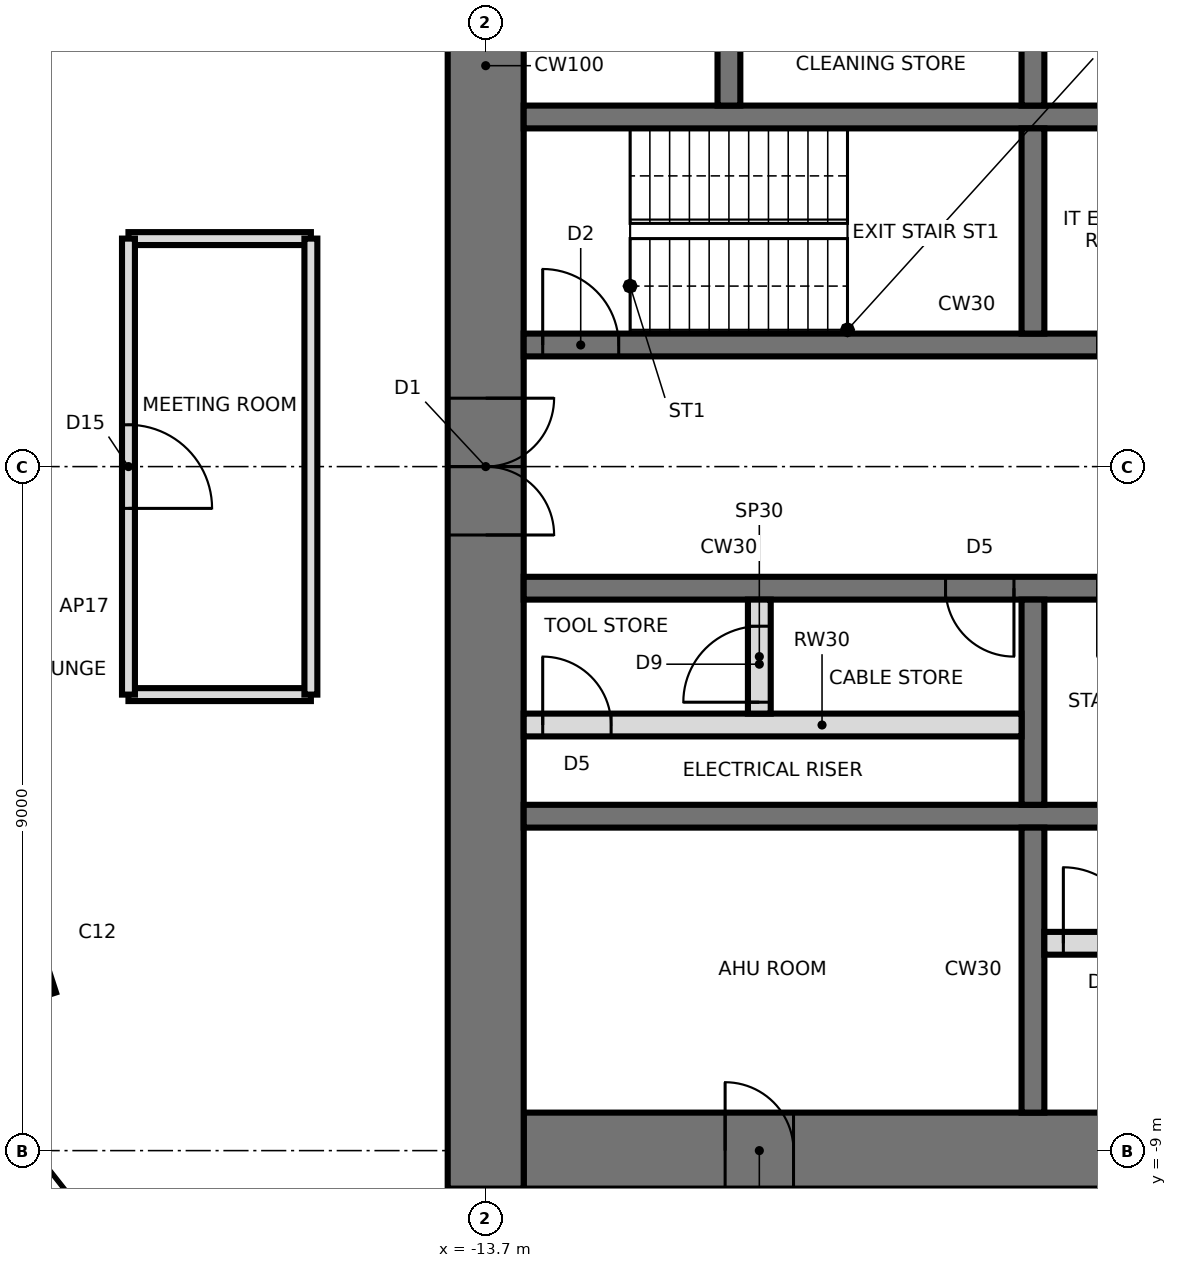
"""IFC4 building model, lengths in metres.
Left out: names, types, materials, properties, quantities, classifications, styles, units other than length and angle.
Written with IfcOpenShell. Run it as: python <this file> out.ifc"""

import sys

from ifc_helpers import new_model, si_unit, direction, frame, frame_2d, origin, origin_2d, place, context, subcontext, project, spatial, rectangle, extrude, element, fill, save


model = new_model("IFC4")
c1 = context("Model", 3, precision=1e-05, world=origin(), true_north=direction((0.0, 1.0)))
c2 = subcontext(c1, "Body", "Model", "MODEL_VIEW")
j1 = project(units=[si_unit("LENGTHUNIT", "METRE"), si_unit("PLANEANGLEUNIT", "RADIAN")], contexts=[c1])
p1 = place(None, origin())
s1 = spatial("IfcSite", under=j1, at=p1, CompositionType="ELEMENT")
p2 = place(p1, origin())
s2 = spatial("IfcBuilding", under=s1, at=p2, CompositionType="ELEMENT")
p3 = place(p2, frame((0.0, 0.0, 256.0)))
s3 = spatial("IfcBuildingStorey", under=s2, at=p3, CompositionType="ELEMENT", Elevation=256.0)
p4 = place(p3, frame((-20.109, -6.534, 0.0), z_axis=(0.0, 0.0, 1.0), x_axis=(-0.951056516295, -0.309016994375, 0.0)))
e1 = element("IfcColumn", 1, at=p4, inside=s3, PredefinedType="COLUMN", context=c2, shape_type="SweptSolid", body=[
    extrude(rectangle(XDim=1.2, YDim=1.2, at=origin_2d()), origin(), (0.0, 0.0, 1.0), 4.2),
])
p5 = place(p3, frame((-13.2, -9.0, 0.0), z_axis=(0.0, 0.0, 1.0), x_axis=(1.0, 0.0, 0.0)))
e2 = element("IfcWall", 2, at=p5, inside=s3, PredefinedType="SHEAR", context=c2, shape_type="SweptSolid", body=[
    extrude(rectangle(XDim=26.4, YDim=1.0, at=frame_2d((13.2, 0.0))), origin(), (0.0, 0.0, 1.0), 4.2),
])
p6 = place(p5, frame((2.65, 0.0, 0.0)))
e3 = element("IfcOpeningElement", 3, at=p6, cuts=e2, PredefinedType="OPENING", context=c2, shape_type="SweptSolid", body=[
    extrude(rectangle(XDim=0.9, YDim=2.1, at=frame_2d((0.45, 1.05))), frame((0.0, 0.51, 0.0), z_axis=(0.0, -1.0, 0.0), x_axis=(1.0, 0.0, 0.0)), (0.0, 0.0, 1.0), 1.02),
])
p7 = place(p5, frame((9.5, 0.0, 0.0)))
e4 = element("IfcOpeningElement", 4, at=p7, cuts=e2, PredefinedType="OPENING", context=c2, shape_type="SweptSolid", body=[
    extrude(rectangle(XDim=0.9, YDim=2.1, at=frame_2d((0.45, 1.05))), frame((0.0, 0.51, 0.0), z_axis=(0.0, -1.0, 0.0), x_axis=(1.0, 0.0, 0.0)), (0.0, 0.0, 1.0), 1.02),
])
p8 = place(p5, frame((16.0, 0.0, 0.0)))
e5 = element("IfcOpeningElement", 5, at=p8, cuts=e2, PredefinedType="OPENING", context=c2, shape_type="SweptSolid", body=[
    extrude(rectangle(XDim=0.9, YDim=2.1, at=frame_2d((0.45, 1.05))), frame((0.0, 0.51, 0.0), z_axis=(0.0, -1.0, 0.0), x_axis=(1.0, 0.0, 0.0)), (0.0, 0.0, 1.0), 1.02),
])
p9 = place(p5, frame((22.85, 0.0, 0.0)))
e6 = element("IfcOpeningElement", 6, at=p9, cuts=e2, PredefinedType="OPENING", context=c2, shape_type="SweptSolid", body=[
    extrude(rectangle(XDim=0.9, YDim=2.1, at=frame_2d((0.45, 1.05))), frame((0.0, 0.51, 0.0), z_axis=(0.0, -1.0, 0.0), x_axis=(1.0, 0.0, 0.0)), (0.0, 0.0, 1.0), 1.02),
])
p10 = place(p3, frame((-13.7, 9.5, 0.0), z_axis=(0.0, 0.0, 1.0), x_axis=(0.0, -1.0, 0.0)))
e7 = element("IfcWall", 7, at=p10, inside=s3, PredefinedType="SHEAR", context=c2, shape_type="SweptSolid", body=[
    extrude(rectangle(XDim=19.0, YDim=1.0, at=frame_2d((9.5, 0.0))), origin(), (0.0, 0.0, 1.0), 4.2),
])
p11 = place(p10, frame((8.6, 0.0, 0.0)))
e8 = element("IfcOpeningElement", 8, at=p11, cuts=e7, PredefinedType="OPENING", context=c2, shape_type="SweptSolid", body=[
    extrude(rectangle(XDim=1.8, YDim=2.4, at=frame_2d((0.9, 1.2))), frame((0.0, 0.51, 0.0), z_axis=(0.0, -1.0, 0.0), x_axis=(1.0, 0.0, 0.0)), (0.0, 0.0, 1.0), 1.02),
])
p12 = place(p3, frame((-13.2, 1.6, 0.0), z_axis=(0.0, 0.0, 1.0), x_axis=(1.0, 0.0, 0.0)))
e9 = element("IfcWall", 9, at=p12, inside=s3, PredefinedType="SHEAR", context=c2, shape_type="SweptSolid", body=[
    extrude(rectangle(XDim=26.4, YDim=0.3, at=frame_2d((13.2, 0.0))), origin(), (0.0, 0.0, 1.0), 4.2),
])
p13 = place(p12, frame((0.25, 0.0, 0.0)))
e10 = element("IfcOpeningElement", 10, at=p13, cuts=e9, PredefinedType="OPENING", context=c2, shape_type="SweptSolid", body=[
    extrude(rectangle(XDim=1.0, YDim=2.1, at=frame_2d((0.5, 1.05))), frame((0.0, 0.16, 0.0), z_axis=(0.0, -1.0, 0.0), x_axis=(1.0, 0.0, 0.0)), (0.0, 0.0, 1.0), 0.32),
])
p14 = place(p12, frame((20.25, 0.0, 0.0)))
e11 = element("IfcOpeningElement", 11, at=p14, cuts=e9, PredefinedType="OPENING", context=c2, shape_type="SweptSolid", body=[
    extrude(rectangle(XDim=1.5, YDim=2.4, at=frame_2d((0.75, 1.2))), frame((0.0, 0.16, 0.0), z_axis=(0.0, -1.0, 0.0), x_axis=(1.0, 0.0, 0.0)), (0.0, 0.0, 1.0), 0.32),
])
p15 = place(p12, frame((7.55, 0.0, 0.0)))
e12 = element("IfcOpeningElement", 12, at=p15, cuts=e9, PredefinedType="OPENING", context=c2, shape_type="SweptSolid", body=[
    extrude(rectangle(XDim=0.9, YDim=2.1, at=frame_2d((0.45, 1.05))), frame((0.0, 0.16, 0.0), z_axis=(0.0, -1.0, 0.0), x_axis=(1.0, 0.0, 0.0)), (0.0, 0.0, 1.0), 0.32),
])
p16 = place(p12, frame((10.15, 0.0, 0.0)))
e13 = element("IfcOpeningElement", 13, at=p16, cuts=e9, PredefinedType="OPENING", context=c2, shape_type="SweptSolid", body=[
    extrude(rectangle(XDim=0.9, YDim=2.1, at=frame_2d((0.45, 1.05))), frame((0.0, 0.16, 0.0), z_axis=(0.0, -1.0, 0.0), x_axis=(1.0, 0.0, 0.0)), (0.0, 0.0, 1.0), 0.32),
])
p17 = place(p12, frame((12.75, 0.0, 0.0)))
e14 = element("IfcOpeningElement", 14, at=p17, cuts=e9, PredefinedType="OPENING", context=c2, shape_type="SweptSolid", body=[
    extrude(rectangle(XDim=0.9, YDim=2.1, at=frame_2d((0.45, 1.05))), frame((0.0, 0.16, 0.0), z_axis=(0.0, -1.0, 0.0), x_axis=(1.0, 0.0, 0.0)), (0.0, 0.0, 1.0), 0.32),
])
p18 = place(p12, frame((15.25, 0.0, 0.0)))
e15 = element("IfcOpeningElement", 15, at=p18, cuts=e9, PredefinedType="OPENING", context=c2, shape_type="SweptSolid", body=[
    extrude(rectangle(XDim=1.1, YDim=2.3, at=frame_2d((0.55, 1.15))), frame((0.0, 0.16, 0.0), z_axis=(0.0, -1.0, 0.0), x_axis=(1.0, 0.0, 0.0)), (0.0, 0.0, 1.0), 0.32),
])
p19 = place(p12, frame((17.85, 0.0, 0.0)))
e16 = element("IfcOpeningElement", 16, at=p19, cuts=e9, PredefinedType="OPENING", context=c2, shape_type="SweptSolid", body=[
    extrude(rectangle(XDim=1.1, YDim=2.3, at=frame_2d((0.55, 1.15))), frame((0.0, 0.16, 0.0), z_axis=(0.0, -1.0, 0.0), x_axis=(1.0, 0.0, 0.0)), (0.0, 0.0, 1.0), 0.32),
])
p20 = place(p12, frame((24.15, 0.0, 0.0)))
e17 = element("IfcOpeningElement", 17, at=p20, cuts=e9, PredefinedType="OPENING", context=c2, shape_type="SweptSolid", body=[
    extrude(rectangle(XDim=0.9, YDim=2.1, at=frame_2d((0.45, 1.05))), frame((0.0, 0.16, 0.0), z_axis=(0.0, -1.0, 0.0), x_axis=(1.0, 0.0, 0.0)), (0.0, 0.0, 1.0), 0.32),
])
p21 = place(p3, frame((-13.2, -1.6, 0.0), z_axis=(0.0, 0.0, 1.0), x_axis=(1.0, 0.0, 0.0)))
e18 = element("IfcWall", 18, at=p21, inside=s3, PredefinedType="SHEAR", context=c2, shape_type="SweptSolid", body=[
    extrude(rectangle(XDim=26.4, YDim=0.3, at=frame_2d((13.2, 0.0))), origin(), (0.0, 0.0, 1.0), 4.2),
])
p22 = place(p21, frame((25.15, 0.0, 0.0)))
e19 = element("IfcOpeningElement", 19, at=p22, cuts=e18, PredefinedType="OPENING", context=c2, shape_type="SweptSolid", body=[
    extrude(rectangle(XDim=1.0, YDim=2.1, at=frame_2d((0.5, 1.05))), frame((0.0, 0.16, 0.0), z_axis=(0.0, -1.0, 0.0), x_axis=(1.0, 0.0, 0.0)), (0.0, 0.0, 1.0), 0.32),
])
p23 = place(p21, frame((7.55, 0.0, 0.0)))
e20 = element("IfcOpeningElement", 20, at=p23, cuts=e18, PredefinedType="OPENING", context=c2, shape_type="SweptSolid", body=[
    extrude(rectangle(XDim=0.9, YDim=2.1, at=frame_2d((0.45, 1.05))), frame((0.0, 0.16, 0.0), z_axis=(0.0, -1.0, 0.0), x_axis=(1.0, 0.0, 0.0)), (0.0, 0.0, 1.0), 0.32),
])
p24 = place(p21, frame((10.15, 0.0, 0.0)))
e21 = element("IfcOpeningElement", 21, at=p24, cuts=e18, PredefinedType="OPENING", context=c2, shape_type="SweptSolid", body=[
    extrude(rectangle(XDim=0.9, YDim=2.1, at=frame_2d((0.45, 1.05))), frame((0.0, 0.16, 0.0), z_axis=(0.0, -1.0, 0.0), x_axis=(1.0, 0.0, 0.0)), (0.0, 0.0, 1.0), 0.32),
])
p25 = place(p21, frame((12.75, 0.0, 0.0)))
e22 = element("IfcOpeningElement", 22, at=p25, cuts=e18, PredefinedType="OPENING", context=c2, shape_type="SweptSolid", body=[
    extrude(rectangle(XDim=0.9, YDim=2.1, at=frame_2d((0.45, 1.05))), frame((0.0, 0.16, 0.0), z_axis=(0.0, -1.0, 0.0), x_axis=(1.0, 0.0, 0.0)), (0.0, 0.0, 1.0), 0.32),
])
p26 = place(p21, frame((15.25, 0.0, 0.0)))
e23 = element("IfcOpeningElement", 23, at=p26, cuts=e18, PredefinedType="OPENING", context=c2, shape_type="SweptSolid", body=[
    extrude(rectangle(XDim=1.1, YDim=2.3, at=frame_2d((0.55, 1.15))), frame((0.0, 0.16, 0.0), z_axis=(0.0, -1.0, 0.0), x_axis=(1.0, 0.0, 0.0)), (0.0, 0.0, 1.0), 0.32),
])
p27 = place(p21, frame((17.85, 0.0, 0.0)))
e24 = element("IfcOpeningElement", 24, at=p27, cuts=e18, PredefinedType="OPENING", context=c2, shape_type="SweptSolid", body=[
    extrude(rectangle(XDim=1.1, YDim=2.3, at=frame_2d((0.55, 1.15))), frame((0.0, 0.16, 0.0), z_axis=(0.0, -1.0, 0.0), x_axis=(1.0, 0.0, 0.0)), (0.0, 0.0, 1.0), 0.32),
])
p28 = place(p21, frame((5.55, 0.0, 0.0)))
e25 = element("IfcOpeningElement", 25, at=p28, cuts=e18, PredefinedType="OPENING", context=c2, shape_type="SweptSolid", body=[
    extrude(rectangle(XDim=0.9, YDim=2.1, at=frame_2d((0.45, 1.05))), frame((0.0, 0.16, 0.0), z_axis=(0.0, -1.0, 0.0), x_axis=(1.0, 0.0, 0.0)), (0.0, 0.0, 1.0), 0.32),
])
for number, where, z_axis, x_axis in (
    (26, (-13.2, 4.6, 0.0), (0.0, 0.0, 1.0), (1.0, 0.0, 0.0)),
    (27, (-13.2, -4.6, 0.0), (0.0, 0.0, 1.0), (1.0, 0.0, 0.0)),
):
    element("IfcWall", number, at=place(p3, frame(where, z_axis=z_axis, x_axis=x_axis)), inside=s3, PredefinedType="SHEAR", context=c2, shape_type="SweptSolid", body=[
        extrude(rectangle(XDim=26.4, YDim=0.3, at=frame_2d((13.2, 0.0))), origin(), (0.0, 0.0, 1.0), 4.2),
    ])
p29 = place(p3, frame((-6.5, 1.75, 0.0), z_axis=(0.0, 0.0, 1.0), x_axis=(0.0, 1.0, 0.0)))
e28 = element("IfcWall", 28, at=p29, inside=s3, PredefinedType="SHEAR", context=c2, shape_type="SweptSolid", body=[
    extrude(rectangle(XDim=2.7, YDim=0.3, at=frame_2d((1.35, 0.0))), origin(), (0.0, 0.0, 1.0), 4.2),
])
p30 = place(p3, frame((-6.5, 4.75, 0.0), z_axis=(0.0, 0.0, 1.0), x_axis=(0.0, 1.0, 0.0)))
e29 = element("IfcWall", 29, at=p30, inside=s3, PredefinedType="SHEAR", context=c2, shape_type="SweptSolid", body=[
    extrude(rectangle(XDim=3.75, YDim=0.3, at=frame_2d((1.875, 0.0))), origin(), (0.0, 0.0, 1.0), 4.2),
])
p31 = place(p3, frame((-6.5, -1.75, 0.0), z_axis=(0.0, 0.0, 1.0), x_axis=(0.0, -1.0, 0.0)))
e30 = element("IfcWall", 30, at=p31, inside=s3, PredefinedType="SHEAR", context=c2, shape_type="SweptSolid", body=[
    extrude(rectangle(XDim=2.7, YDim=0.3, at=frame_2d((1.35, 0.0))), origin(), (0.0, 0.0, 1.0), 4.2),
])
for number, where, z_axis, x_axis in (
    (31, (-6.5, -4.75, 0.0), (0.0, 0.0, 1.0), (0.0, -1.0, 0.0)),
    (32, (-10.5, 4.75, 0.0), (0.0, 0.0, 1.0), (0.0, 1.0, 0.0)),
):
    element("IfcWall", number, at=place(p3, frame(where, z_axis=z_axis, x_axis=x_axis)), inside=s3, PredefinedType="SHEAR", context=c2, shape_type="SweptSolid", body=[
        extrude(rectangle(XDim=3.75, YDim=0.3, at=frame_2d((1.875, 0.0))), origin(), (0.0, 0.0, 1.0), 4.2),
    ])
p32 = place(p3, frame((-6.35, -6.272, 0.0), z_axis=(0.0, 0.0, 1.0), x_axis=(1.0, 0.0, 0.0)))
e33 = element("IfcWall", 33, at=p32, inside=s3, PredefinedType="PARTITIONING", context=c2, shape_type="SweptSolid", body=[
    extrude(rectangle(XDim=6.2, YDim=0.3, at=frame_2d((3.1, 0.0))), origin(), (0.0, 0.0, 1.0), 4.04),
])
p33 = place(p32, frame((0.25, 0.0, 0.0)))
e34 = element("IfcOpeningElement", 34, at=p33, cuts=e33, PredefinedType="OPENING", context=c2, shape_type="SweptSolid", body=[
    extrude(rectangle(XDim=1.0, YDim=2.4, at=frame_2d((0.5, 1.2))), frame((0.0, 0.16, 0.0), z_axis=(0.0, -1.0, 0.0), x_axis=(1.0, 0.0, 0.0)), (0.0, 0.0, 1.0), 0.32),
])
p34 = place(p3, frame((-13.2, -3.4, 0.0), z_axis=(0.0, 0.0, 1.0), x_axis=(1.0, 0.0, 0.0)))
e35 = element("IfcWall", 35, at=p34, inside=s3, PredefinedType="SOLIDWALL", context=c2, shape_type="SweptSolid", body=[
    extrude(rectangle(XDim=6.55, YDim=0.3, at=frame_2d((3.275, 0.0))), origin(), (0.0, 0.0, 1.0), 4.04),
])
p35 = place(p34, frame((0.25, 0.0, 0.0)))
e36 = element("IfcOpeningElement", 36, at=p35, cuts=e35, PredefinedType="OPENING", context=c2, shape_type="SweptSolid", body=[
    extrude(rectangle(XDim=0.9, YDim=2.1, at=frame_2d((0.45, 1.05))), frame((0.0, 0.16, 0.0), z_axis=(0.0, -1.0, 0.0), x_axis=(1.0, 0.0, 0.0)), (0.0, 0.0, 1.0), 0.32),
])
p36 = place(p3, frame((-10.1, -3.25, 0.0), z_axis=(0.0, 0.0, 1.0), x_axis=(0.0, 1.0, 0.0)))
e37 = element("IfcWall", 37, at=p36, inside=s3, PredefinedType="PARTITIONING", context=c2, shape_type="SweptSolid", body=[
    extrude(rectangle(XDim=1.5, YDim=0.3, at=frame_2d((0.75, 0.0))), origin(), (0.0, 0.0, 1.0), 4.04),
])
p37 = place(p36, frame((0.15, 0.0, 0.0)))
e38 = element("IfcOpeningElement", 38, at=p37, cuts=e37, PredefinedType="OPENING", context=c2, shape_type="SweptSolid", body=[
    extrude(rectangle(XDim=1.0, YDim=2.4, at=frame_2d((0.5, 1.2))), frame((0.0, 0.16, 0.0), z_axis=(0.0, -1.0, 0.0), x_axis=(1.0, 0.0, 0.0)), (0.0, 0.0, 1.0), 0.32),
])
for number, where, z_axis, x_axis in (
    (39, (-16.0, -3.0, 0.0), (0.0, 0.0, 1.0), (-1.0, 0.0, 0.0)),
    (40, (-18.4, 3.0, 0.0), (0.0, 0.0, 1.0), (1.0, 0.0, 0.0)),
):
    element("IfcWall", number, at=place(p3, frame(where, z_axis=z_axis, x_axis=x_axis)), inside=s3, PredefinedType="PARTITIONING", context=c2, shape_type="SweptSolid", body=[
        extrude(rectangle(XDim=2.4, YDim=0.17, at=frame_2d((1.2, 0.0))), origin(), (0.0, 0.0, 1.0), 4.04),
    ])
p38 = place(p3, frame((-18.4, -3.0, 0.0), z_axis=(0.0, 0.0, 1.0), x_axis=(0.0, 1.0, 0.0)))
e41 = element("IfcWall", 41, at=p38, inside=s3, PredefinedType="PARTITIONING", context=c2, shape_type="SweptSolid", body=[
    extrude(rectangle(XDim=6.0, YDim=0.17, at=frame_2d((3.0, 0.0))), origin(), (0.0, 0.0, 1.0), 4.04),
])
p39 = place(p38, frame((2.45, 0.0, 0.0)))
e42 = element("IfcOpeningElement", 42, at=p39, cuts=e41, PredefinedType="OPENING", context=c2, shape_type="SweptSolid", body=[
    extrude(rectangle(XDim=1.1, YDim=2.4, at=frame_2d((0.55, 1.2))), frame((0.0, 0.095, 0.0), z_axis=(0.0, -1.0, 0.0), x_axis=(1.0, 0.0, 0.0)), (0.0, 0.0, 1.0), 0.19),
])
p40 = place(p3, frame((-16.0, 3.0, 0.0), z_axis=(0.0, 0.0, 1.0), x_axis=(0.0, -1.0, 0.0)))
e43 = element("IfcWall", 43, at=p40, inside=s3, PredefinedType="PARTITIONING", context=c2, shape_type="SweptSolid", body=[
    extrude(rectangle(XDim=6.0, YDim=0.17, at=frame_2d((3.0, 0.0))), origin(), (0.0, 0.0, 1.0), 4.04),
])
p41 = place(p11, origin())
e44 = element("IfcDoor", 44, at=p41, inside=s3, OperationType="DOUBLE_DOOR_SINGLE_SWING", PredefinedType="DOOR", context=c2, shape_type="SweptSolid", body=[
    extrude(rectangle(XDim=1.72, YDim=2.36, at=frame_2d((0.9, 1.18))), frame((0.0, 0.025, 0.0), z_axis=(0.0, -1.0, 0.0), x_axis=(1.0, 0.0, 0.0)), (0.0, 0.0, 1.0), 0.05),
    extrude(rectangle(XDim=0.04, YDim=2.4, at=frame_2d((0.02, 1.2))), frame((0.0, 0.25, 0.0), z_axis=(0.0, -1.0, 0.0), x_axis=(1.0, 0.0, 0.0)), (0.0, 0.0, 1.0), 0.5),
    extrude(rectangle(XDim=0.04, YDim=2.4, at=frame_2d((1.78, 1.2))), frame((0.0, 0.25, 0.0), z_axis=(0.0, -1.0, 0.0), x_axis=(1.0, 0.0, 0.0)), (0.0, 0.0, 1.0), 0.5),
    extrude(rectangle(XDim=1.72, YDim=0.04, at=frame_2d((0.9, 2.38))), frame((0.0, 0.25, 0.0), z_axis=(0.0, -1.0, 0.0), x_axis=(1.0, 0.0, 0.0)), (0.0, 0.0, 1.0), 0.5),
])
fill(e8, e44)
p42 = place(p13, origin())
e45 = element("IfcDoor", 45, at=p42, inside=s3, OperationType="SINGLE_SWING_LEFT", PredefinedType="DOOR", context=c2, shape_type="SweptSolid", body=[
    extrude(rectangle(XDim=1.0, YDim=2.1, at=frame_2d((0.5, 1.05))), frame((0.0, 0.025, 0.0), z_axis=(0.0, -1.0, 0.0), x_axis=(1.0, 0.0, 0.0)), (0.0, 0.0, 1.0), 0.05),
])
fill(e10, e45)
p43 = place(p28, frame((0.9, 0.0, 0.0), z_axis=(0.0, 0.0, 1.0), x_axis=(-1.0, 0.0, 0.0)))
e46 = element("IfcDoor", 46, at=p43, inside=s3, OperationType="SINGLE_SWING_LEFT", PredefinedType="DOOR", context=c2, shape_type="SweptSolid", body=[
    extrude(rectangle(XDim=0.9, YDim=2.1, at=frame_2d((0.45, 1.05))), frame((0.0, 0.025, 0.0), z_axis=(0.0, -1.0, 0.0), x_axis=(1.0, 0.0, 0.0)), (0.0, 0.0, 1.0), 0.05),
])
fill(e25, e46)
p44 = place(p6, origin())
e47 = element("IfcDoor", 47, at=p44, inside=s3, OperationType="SINGLE_SWING_LEFT", PredefinedType="DOOR", context=c2, shape_type="SweptSolid", body=[
    extrude(rectangle(XDim=0.82, YDim=2.06, at=frame_2d((0.45, 1.03))), frame((0.0, 0.025, 0.0), z_axis=(0.0, -1.0, 0.0), x_axis=(1.0, 0.0, 0.0)), (0.0, 0.0, 1.0), 0.05),
    extrude(rectangle(XDim=0.04, YDim=2.1, at=frame_2d((0.02, 1.05))), frame((0.0, 0.25, 0.0), z_axis=(0.0, -1.0, 0.0), x_axis=(1.0, 0.0, 0.0)), (0.0, 0.0, 1.0), 0.5),
    extrude(rectangle(XDim=0.04, YDim=2.1, at=frame_2d((0.88, 1.05))), frame((0.0, 0.25, 0.0), z_axis=(0.0, -1.0, 0.0), x_axis=(1.0, 0.0, 0.0)), (0.0, 0.0, 1.0), 0.5),
    extrude(rectangle(XDim=0.82, YDim=0.04, at=frame_2d((0.45, 2.08))), frame((0.0, 0.25, 0.0), z_axis=(0.0, -1.0, 0.0), x_axis=(1.0, 0.0, 0.0)), (0.0, 0.0, 1.0), 0.5),
])
fill(e3, e47)
p45 = place(p33, origin())
e48 = element("IfcDoor", 48, at=p45, inside=s3, OperationType="SINGLE_SWING_LEFT", PredefinedType="DOOR", context=c2, shape_type="SweptSolid", body=[
    extrude(rectangle(XDim=1.0, YDim=2.4, at=frame_2d((0.5, 1.2))), frame((0.0, 0.025, 0.0), z_axis=(0.0, -1.0, 0.0), x_axis=(1.0, 0.0, 0.0)), (0.0, 0.0, 1.0), 0.05),
])
fill(e34, e48)
p46 = place(p35, origin())
e49 = element("IfcDoor", 49, at=p46, inside=s3, OperationType="SINGLE_SWING_LEFT", PredefinedType="DOOR", context=c2, shape_type="SweptSolid", body=[
    extrude(rectangle(XDim=0.9, YDim=2.1, at=frame_2d((0.45, 1.05))), frame((0.0, 0.025, 0.0), z_axis=(0.0, -1.0, 0.0), x_axis=(1.0, 0.0, 0.0)), (0.0, 0.0, 1.0), 0.05),
])
fill(e36, e49)
p47 = place(p37, origin())
e50 = element("IfcDoor", 50, at=p47, inside=s3, OperationType="SINGLE_SWING_LEFT", PredefinedType="DOOR", context=c2, shape_type="SweptSolid", body=[
    extrude(rectangle(XDim=1.0, YDim=2.4, at=frame_2d((0.5, 1.2))), frame((0.0, 0.025, 0.0), z_axis=(0.0, -1.0, 0.0), x_axis=(1.0, 0.0, 0.0)), (0.0, 0.0, 1.0), 0.05),
])
fill(e38, e50)
p48 = place(p39, frame((1.1, 0.0, 0.0), z_axis=(0.0, 0.0, 1.0), x_axis=(-1.0, 0.0, 0.0)))
e51 = element("IfcDoor", 51, at=p48, inside=s3, OperationType="SINGLE_SWING_RIGHT", PredefinedType="DOOR", context=c2, shape_type="SweptSolid", body=[
    extrude(rectangle(XDim=1.1, YDim=2.4, at=frame_2d((0.55, 1.2))), frame((0.0, 0.025, 0.0), z_axis=(0.0, -1.0, 0.0), x_axis=(1.0, 0.0, 0.0)), (0.0, 0.0, 1.0), 0.05),
])
fill(e42, e51)
save(model, sys.argv[1])
